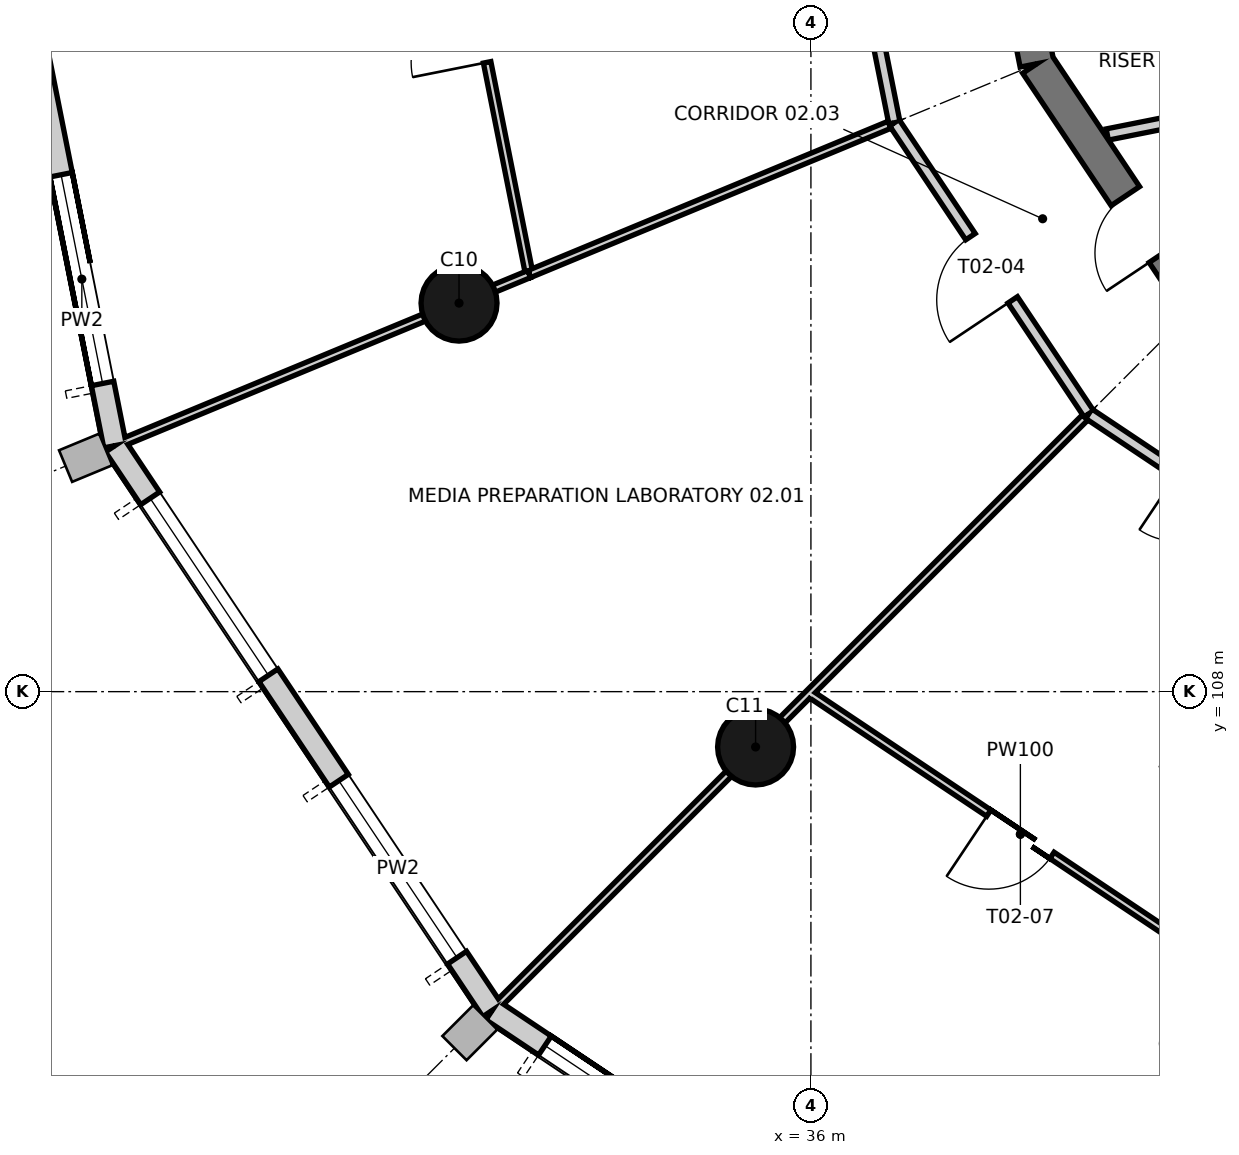
"""IFC4 building model, lengths in metres.
Left out: names, types, materials, properties, quantities, classifications, styles, units other than length and angle.
Written with IfcOpenShell. Run it as: python <this file> out.ifc"""

import sys

from ifc_helpers import new_model, si_unit, direction, frame, frame_2d, origin, origin_2d, place, context, subcontext, project, spatial, polyline, rectangle, circle, outline, extrude, element, fill, save


model = new_model("IFC4")
c1 = context("Model", 3, precision=1e-05, world=origin(), true_north=direction((0.0, 1.0)))
c2 = subcontext(c1, "Body", "Model", "MODEL_VIEW")
j1 = project(units=[si_unit("LENGTHUNIT", "METRE"), si_unit("PLANEANGLEUNIT", "RADIAN")], contexts=[c1])
p1 = place(None, origin())
s1 = spatial("IfcSite", under=j1, at=p1, CompositionType="ELEMENT")
p2 = place(p1, origin())
s2 = spatial("IfcBuilding", under=s1, at=p2, CompositionType="ELEMENT")
p3 = place(p2, frame((0.0, 0.0, 10.8)))
s3 = spatial("IfcBuildingStorey", under=s2, at=p3, CompositionType="ELEMENT", Elevation=10.8)
p4 = place(p3, frame((38.229, 120.0, 0.0), z_axis=(0.0, 0.0, 1.0), x_axis=(0.195069197673, -0.98078948206, 0.0)))
e1 = element("IfcWall", 1, at=p4, inside=s3, PredefinedType="SHEAR", context=c2, shape_type="SweptSolid", body=[
    extrude(outline(polyline([(-0.045, -0.225), (3.857, -0.225), (3.768, 0.225), (0.045, 0.225), (-0.045, -0.225)])), origin(), (0.0, 0.0, 1.0), 4.8),
])
p5 = place(p4, frame((1.095, 0.0, 0.0)))
e2 = element("IfcOpeningElement", 2, at=p5, cuts=e1, PredefinedType="OPENING", context=c2, shape_type="SweptSolid", body=[
    extrude(rectangle(XDim=1.6, YDim=2.1, at=frame_2d((0.8, 1.05))), frame((0.0, 0.235, 0.0), z_axis=(0.0, -1.0, 0.0), x_axis=(1.0, 0.0, 0.0)), (0.0, 0.0, 1.0), 0.47),
])
p6 = place(p3, frame((38.973, 116.261, 0.0), z_axis=(0.0, 0.0, 1.0), x_axis=(0.555542277102, -0.83148829117, 0.0)))
e3 = element("IfcWall", 3, at=p6, inside=s3, PredefinedType="SHEAR", context=c2, shape_type="SweptSolid", body=[
    extrude(outline(polyline([(-0.045, -0.225), (3.857, -0.225), (3.768, 0.225), (0.045, 0.225), (-0.045, -0.225)])), origin(), (0.0, 0.0, 1.0), 4.8),
])
p7 = place(p6, frame((2.095, 0.0, 0.0)))
e4 = element("IfcOpeningElement", 4, at=p7, cuts=e3, PredefinedType="OPENING", context=c2, shape_type="SweptSolid", body=[
    extrude(rectangle(XDim=0.9, YDim=2.1, at=frame_2d((0.45, 1.05))), frame((0.0, 0.235, 0.0), z_axis=(0.0, -1.0, 0.0), x_axis=(1.0, 0.0, 0.0)), (0.0, 0.0, 1.0), 0.47),
])
for number, where, z_axis, x_axis in (
    (5, (31.37, 113.112, 0.0), (0.0, 0.0, 1.0), (1.0, 0.0, 0.0)),
    (6, (35.272, 107.272, 0.0), (0.0, 0.0, 1.0), (1.0, 0.0, 0.0)),
):
    element("IfcColumn", number, at=place(p3, frame(where, z_axis=z_axis, x_axis=x_axis)), inside=s3, PredefinedType="COLUMN", context=c2, shape_type="SweptSolid", body=[
        extrude(circle(Radius=0.5, at=origin_2d()), origin(), (0.0, 0.0, 1.0), 4.8),
    ])
p8 = place(p3, frame((25.1, 120.0, 0.0), z_axis=(0.0, 0.0, 1.0), x_axis=(0.195091388425, -0.980785068281, 0.0)))
e7 = element("IfcWall", 7, at=p8, inside=s3, PredefinedType="SOLIDWALL", context=c2, shape_type="SweptSolid", body=[
    extrude(outline(polyline([(-0.03, -0.15), (8.965, -0.15), (8.905, 0.15), (0.03, 0.15), (-0.03, -0.15)])), origin(), (0.0, 0.0, 1.0), 3.72),
])
p9 = place(p8, frame((0.834, 0.0, 0.9)))
e8 = element("IfcOpeningElement", 8, at=p9, cuts=e7, PredefinedType="OPENING", context=c2, shape_type="SweptSolid", body=[
    extrude(rectangle(XDim=2.8, YDim=1.8, at=frame_2d((1.4, 0.9))), frame((0.0, 0.16, 0.0), z_axis=(0.0, -1.0, 0.0), x_axis=(1.0, 0.0, 0.0)), (0.0, 0.0, 1.0), 0.32),
])
p10 = place(p8, frame((5.302, 0.0, 0.9)))
e9 = element("IfcOpeningElement", 9, at=p10, cuts=e7, PredefinedType="OPENING", context=c2, shape_type="SweptSolid", body=[
    extrude(rectangle(XDim=2.8, YDim=1.8, at=frame_2d((1.4, 0.9))), frame((0.0, 0.16, 0.0), z_axis=(0.0, -1.0, 0.0), x_axis=(1.0, 0.0, 0.0)), (0.0, 0.0, 1.0), 0.32),
])
p11 = place(p3, frame((26.843, 111.237, 0.0), z_axis=(0.0, 0.0, 1.0), x_axis=(0.555576354317, -0.83146552215, 0.0)))
e10 = element("IfcWall", 10, at=p11, inside=s3, PredefinedType="SOLIDWALL", context=c2, shape_type="SweptSolid", body=[
    extrude(outline(polyline([(-0.03, -0.15), (8.965, -0.15), (8.905, 0.15), (0.03, 0.15), (-0.03, -0.15)])), origin(), (0.0, 0.0, 1.0), 3.72),
])
p12 = place(p11, frame((0.834, 0.0, 0.9)))
e11 = element("IfcOpeningElement", 11, at=p12, cuts=e10, PredefinedType="OPENING", context=c2, shape_type="SweptSolid", body=[
    extrude(rectangle(XDim=2.8, YDim=1.8, at=frame_2d((1.4, 0.9))), frame((0.0, 0.16, 0.0), z_axis=(0.0, -1.0, 0.0), x_axis=(1.0, 0.0, 0.0)), (0.0, 0.0, 1.0), 0.32),
])
p13 = place(p11, frame((5.302, 0.0, 0.9)))
e12 = element("IfcOpeningElement", 12, at=p13, cuts=e10, PredefinedType="OPENING", context=c2, shape_type="SweptSolid", body=[
    extrude(rectangle(XDim=2.8, YDim=1.8, at=frame_2d((1.4, 0.9))), frame((0.0, 0.16, 0.0), z_axis=(0.0, -1.0, 0.0), x_axis=(1.0, 0.0, 0.0)), (0.0, 0.0, 1.0), 0.32),
])
p14 = place(p3, frame((31.807, 103.807, 0.0), z_axis=(0.0, 0.0, 1.0), x_axis=(0.83146552215, -0.555576354317, 0.0)))
e13 = element("IfcWall", 13, at=p14, inside=s3, PredefinedType="SOLIDWALL", context=c2, shape_type="SweptSolid", body=[
    extrude(outline(polyline([(-0.03, -0.15), (8.965, -0.15), (8.905, 0.15), (0.03, 0.15), (-0.03, -0.15)])), origin(), (0.0, 0.0, 1.0), 3.72),
])
p15 = place(p14, frame((0.834, 0.0, 0.9)))
e14 = element("IfcOpeningElement", 14, at=p15, cuts=e13, PredefinedType="OPENING", context=c2, shape_type="SweptSolid", body=[
    extrude(rectangle(XDim=2.8, YDim=1.8, at=frame_2d((1.4, 0.9))), frame((0.0, 0.16, 0.0), z_axis=(0.0, -1.0, 0.0), x_axis=(1.0, 0.0, 0.0)), (0.0, 0.0, 1.0), 0.32),
])
p16 = place(p14, frame((5.302, 0.0, 0.9)))
e15 = element("IfcOpeningElement", 15, at=p16, cuts=e13, PredefinedType="OPENING", context=c2, shape_type="SweptSolid", body=[
    extrude(rectangle(XDim=2.8, YDim=1.8, at=frame_2d((1.4, 0.9))), frame((0.0, 0.16, 0.0), z_axis=(0.0, -1.0, 0.0), x_axis=(1.0, 0.0, 0.0)), (0.0, 0.0, 1.0), 0.32),
])
p17 = place(p3, frame((39.899, 115.33, 0.0), z_axis=(0.0, 0.0, 1.0), x_axis=(0.980782755583, 0.195103014715, 0.0)))
e16 = element("IfcWall", 16, at=p17, inside=s3, PredefinedType="PARTITIONING", context=c2, shape_type="SweptSolid", body=[
    extrude(rectangle(XDim=2.456, YDim=0.15, at=frame_2d((1.228, 0.0))), origin(), (0.0, 0.0, 1.0), 4.52),
])
p18 = place(p3, frame((37.098, 115.484, 0.0), z_axis=(0.0, 0.0, 1.0), x_axis=(-0.19508608079, 0.980786124026, 0.0)))
e17 = element("IfcWall", 17, at=p18, inside=s3, PredefinedType="PARTITIONING", context=c2, shape_type="SweptSolid", body=[
    extrude(rectangle(XDim=4.604, YDim=0.15, at=frame_2d((2.302, 0.0))), origin(), (0.0, 0.0, 1.0), 4.52),
])
p19 = place(p18, frame((1.402, 0.0, 0.0)))
e18 = element("IfcOpeningElement", 18, at=p19, cuts=e17, PredefinedType="OPENING", context=c2, shape_type="SweptSolid", body=[
    extrude(rectangle(XDim=1.8, YDim=2.1, at=frame_2d((0.9, 1.05))), frame((0.0, 0.085, 0.0), z_axis=(0.0, -1.0, 0.0), x_axis=(1.0, 0.0, 0.0)), (0.0, 0.0, 1.0), 0.17),
])
p20 = place(p3, frame((39.656, 111.656, 0.0), z_axis=(0.0, 0.0, 1.0), x_axis=(-0.555544233776, 0.831486983854, 0.0)))
e19 = element("IfcWall", 19, at=p20, inside=s3, PredefinedType="PARTITIONING", context=c2, shape_type="SweptSolid", body=[
    extrude(rectangle(XDim=4.604, YDim=0.15, at=frame_2d((2.302, 0.0))), origin(), (0.0, 0.0, 1.0), 4.52),
])
p21 = place(p20, frame((1.802, 0.0, 0.0)))
e20 = element("IfcOpeningElement", 20, at=p21, cuts=e19, PredefinedType="OPENING", context=c2, shape_type="SweptSolid", body=[
    extrude(rectangle(XDim=1.0, YDim=2.1, at=frame_2d((0.5, 1.05))), frame((0.0, 0.085, 0.0), z_axis=(0.0, -1.0, 0.0), x_axis=(1.0, 0.0, 0.0)), (0.0, 0.0, 1.0), 0.17),
])
p22 = place(p3, frame((43.484, 109.098, 0.0), z_axis=(0.0, 0.0, 1.0), x_axis=(-0.831486983854, 0.555544233776, 0.0)))
e21 = element("IfcWall", 21, at=p22, inside=s3, PredefinedType="PARTITIONING", context=c2, shape_type="SweptSolid", body=[
    extrude(rectangle(XDim=4.604, YDim=0.15, at=frame_2d((2.302, 0.0))), origin(), (0.0, 0.0, 1.0), 4.52),
])
p23 = place(p22, frame((1.402, 0.0, 0.0)))
e22 = element("IfcOpeningElement", 22, at=p23, cuts=e21, PredefinedType="OPENING", context=c2, shape_type="SweptSolid", body=[
    extrude(rectangle(XDim=1.8, YDim=2.1, at=frame_2d((0.9, 1.05))), frame((0.0, 0.085, 0.0), z_axis=(0.0, -1.0, 0.0), x_axis=(1.0, 0.0, 0.0)), (0.0, 0.0, 1.0), 0.17),
])
p24 = place(p3, frame((32.285, 113.54, 0.0), z_axis=(0.0, 0.0, 1.0), x_axis=(-0.195068250166, 0.980789670509, 0.0)))
e23 = element("IfcWall", 23, at=p24, inside=s3, PredefinedType="PARTITIONING", context=c2, shape_type="SweptSolid", body=[
    extrude(rectangle(XDim=6.587, YDim=0.1, at=frame_2d((3.293, 0.0))), origin(), (0.0, 0.0, 1.0), 4.52),
])
p25 = place(p24, frame((2.794, 0.0, 0.0)))
e24 = element("IfcOpeningElement", 24, at=p25, cuts=e23, PredefinedType="OPENING", context=c2, shape_type="SweptSolid", body=[
    extrude(rectangle(XDim=1.0, YDim=2.1, at=frame_2d((0.5, 1.05))), frame((0.0, 0.06, 0.0), z_axis=(0.0, -1.0, 0.0), x_axis=(1.0, 0.0, 0.0)), (0.0, 0.0, 1.0), 0.12),
])
p26 = place(p3, frame((37.032, 115.457, 0.0), z_axis=(0.0, 0.0, 1.0), x_axis=(-0.923873517093, -0.382697954548, 0.0)))
e25 = element("IfcWall", 25, at=p26, inside=s3, PredefinedType="PARTITIONING", context=c2, shape_type="SweptSolid", body=[
    extrude(rectangle(XDim=5.128, YDim=0.1, at=frame_2d((2.564, 0.0))), origin(), (0.0, 0.0, 1.0), 3.72),
])
p27 = place(p3, frame((30.917, 112.924, 0.0), z_axis=(0.0, 0.0, 1.0), x_axis=(-0.923860288639, -0.382729887879, 0.0)))
e26 = element("IfcWall", 26, at=p27, inside=s3, PredefinedType="PARTITIONING", context=c2, shape_type="SweptSolid", body=[
    extrude(rectangle(XDim=4.277, YDim=0.1, at=frame_2d((2.139, 0.0))), origin(), (0.0, 0.0, 1.0), 3.72),
])
p28 = place(p3, frame((32.294, 113.494, 0.0), z_axis=(0.0, 0.0, 1.0), x_axis=(-0.923952664473, -0.382506828453, 0.0)))
e27 = element("IfcWall", 27, at=p28, inside=s3, PredefinedType="PARTITIONING", context=c2, shape_type="SweptSolid", body=[
    extrude(rectangle(XDim=0.51, YDim=0.1, at=frame_2d((0.255, 0.0))), origin(), (0.0, 0.0, 1.0), 3.72),
])
p29 = place(p3, frame((39.605, 111.605, 0.0), z_axis=(0.0, 0.0, 1.0), x_axis=(-0.707106781187, -0.707106781187, 0.0)))
e28 = element("IfcWall", 28, at=p29, inside=s3, PredefinedType="PARTITIONING", context=c2, shape_type="SweptSolid", body=[
    extrude(rectangle(XDim=5.128, YDim=0.1, at=frame_2d((2.564, 0.0))), origin(), (0.0, 0.0, 1.0), 3.72),
])
p30 = place(p3, frame((34.926, 106.926, 0.0), z_axis=(0.0, 0.0, 1.0), x_axis=(-0.707106781187, -0.707106781187, 0.0)))
e29 = element("IfcWall", 29, at=p30, inside=s3, PredefinedType="PARTITIONING", context=c2, shape_type="SweptSolid", body=[
    extrude(rectangle(XDim=4.277, YDim=0.1, at=frame_2d((2.138, 0.0))), origin(), (0.0, 0.0, 1.0), 3.72),
])
p31 = place(p3, frame((35.979, 107.979, 0.0), z_axis=(0.0, 0.0, 1.0), x_axis=(-0.707106781187, -0.707106781187, 0.0)))
e30 = element("IfcWall", 30, at=p31, inside=s3, PredefinedType="PARTITIONING", context=c2, shape_type="SweptSolid", body=[
    extrude(rectangle(XDim=0.51, YDim=0.1, at=frame_2d((0.255, 0.0))), origin(), (0.0, 0.0, 1.0), 3.72),
])
p32 = place(p3, frame((41.494, 104.294, 0.0), z_axis=(0.0, 0.0, 1.0), x_axis=(-0.831468235155, 0.555572294061, 0.0)))
e31 = element("IfcWall", 31, at=p32, inside=s3, PredefinedType="PARTITIONING", context=c2, shape_type="SweptSolid", body=[
    extrude(rectangle(XDim=6.587, YDim=0.1, at=frame_2d((3.293, 0.0))), origin(), (0.0, 0.0, 1.0), 4.52),
])
p33 = place(p32, frame((2.793, 0.0, 0.0)))
e32 = element("IfcOpeningElement", 32, at=p33, cuts=e31, PredefinedType="OPENING", context=c2, shape_type="SweptSolid", body=[
    extrude(rectangle(XDim=1.0, YDim=2.1, at=frame_2d((0.5, 1.05))), frame((0.0, 0.06, 0.0), z_axis=(0.0, -1.0, 0.0), x_axis=(1.0, 0.0, 0.0)), (0.0, 0.0, 1.0), 0.12),
])
p34 = place(p10, origin())
e33 = element("IfcWindow", 33, at=p34, inside=s3, PartitioningType="DOUBLE_PANEL_VERTICAL", PredefinedType="WINDOW", context=c2, shape_type="SweptSolid", body=[
    extrude(rectangle(XDim=2.8, YDim=1.8, at=frame_2d((1.4, 0.9))), frame((0.0, 0.03, 0.0), z_axis=(0.0, -1.0, 0.0), x_axis=(1.0, 0.0, 0.0)), (0.0, 0.0, 1.0), 0.06),
])
fill(e9, e33)
p35 = place(p12, origin())
e34 = element("IfcWindow", 34, at=p35, inside=s3, PartitioningType="DOUBLE_PANEL_VERTICAL", PredefinedType="WINDOW", context=c2, shape_type="SweptSolid", body=[
    extrude(rectangle(XDim=2.8, YDim=1.8, at=frame_2d((1.4, 0.9))), frame((0.0, 0.03, 0.0), z_axis=(0.0, -1.0, 0.0), x_axis=(1.0, 0.0, 0.0)), (0.0, 0.0, 1.0), 0.06),
])
fill(e11, e34)
p36 = place(p13, origin())
e35 = element("IfcWindow", 35, at=p36, inside=s3, PartitioningType="DOUBLE_PANEL_VERTICAL", PredefinedType="WINDOW", context=c2, shape_type="SweptSolid", body=[
    extrude(rectangle(XDim=2.8, YDim=1.8, at=frame_2d((1.4, 0.9))), frame((0.0, 0.03, 0.0), z_axis=(0.0, -1.0, 0.0), x_axis=(1.0, 0.0, 0.0)), (0.0, 0.0, 1.0), 0.06),
])
fill(e12, e35)
p37 = place(p15, origin())
e36 = element("IfcWindow", 36, at=p37, inside=s3, PartitioningType="DOUBLE_PANEL_VERTICAL", PredefinedType="WINDOW", context=c2, shape_type="SweptSolid", body=[
    extrude(rectangle(XDim=2.8, YDim=1.8, at=frame_2d((1.4, 0.9))), frame((0.0, 0.03, 0.0), z_axis=(0.0, -1.0, 0.0), x_axis=(1.0, 0.0, 0.0)), (0.0, 0.0, 1.0), 0.06),
])
fill(e14, e36)
p38 = place(p7, frame((0.9, 0.0, 0.0), z_axis=(0.0, 0.0, 1.0), x_axis=(-1.0, 0.0, 0.0)))
e37 = element("IfcDoor", 37, at=p38, inside=s3, OperationType="SINGLE_SWING_LEFT", PredefinedType="DOOR", context=c2, shape_type="SweptSolid", body=[
    extrude(rectangle(XDim=0.9, YDim=2.1, at=frame_2d((0.45, 1.05))), frame((0.0, 0.025, 0.0), z_axis=(0.0, -1.0, 0.0), x_axis=(1.0, 0.0, 0.0)), (0.0, 0.0, 1.0), 0.05),
])
fill(e4, e37)
p39 = place(p25, origin())
e38 = element("IfcDoor", 38, at=p39, inside=s3, OperationType="SINGLE_SWING_LEFT", PredefinedType="DOOR", context=c2, shape_type="SweptSolid", body=[
    extrude(rectangle(XDim=1.0, YDim=2.1, at=frame_2d((0.5, 1.05))), frame((0.0, 0.025, 0.0), z_axis=(0.0, -1.0, 0.0), x_axis=(1.0, 0.0, 0.0)), (0.0, 0.0, 1.0), 0.05),
])
fill(e24, e38)
p40 = place(p21, origin())
e39 = element("IfcDoor", 39, at=p40, inside=s3, OperationType="SINGLE_SWING_LEFT", PredefinedType="DOOR", context=c2, shape_type="SweptSolid", body=[
    extrude(rectangle(XDim=1.0, YDim=2.1, at=frame_2d((0.5, 1.05))), frame((0.0, 0.025, 0.0), z_axis=(0.0, -1.0, 0.0), x_axis=(1.0, 0.0, 0.0)), (0.0, 0.0, 1.0), 0.05),
])
fill(e20, e39)
p41 = place(p33, origin())
e40 = element("IfcDoor", 40, at=p41, inside=s3, OperationType="SINGLE_SWING_RIGHT", PredefinedType="DOOR", context=c2, shape_type="SweptSolid", body=[
    extrude(rectangle(XDim=1.0, YDim=2.1, at=frame_2d((0.5, 1.05))), frame((0.0, 0.025, 0.0), z_axis=(0.0, -1.0, 0.0), x_axis=(1.0, 0.0, 0.0)), (0.0, 0.0, 1.0), 0.05),
])
fill(e32, e40)
save(model, sys.argv[1])
